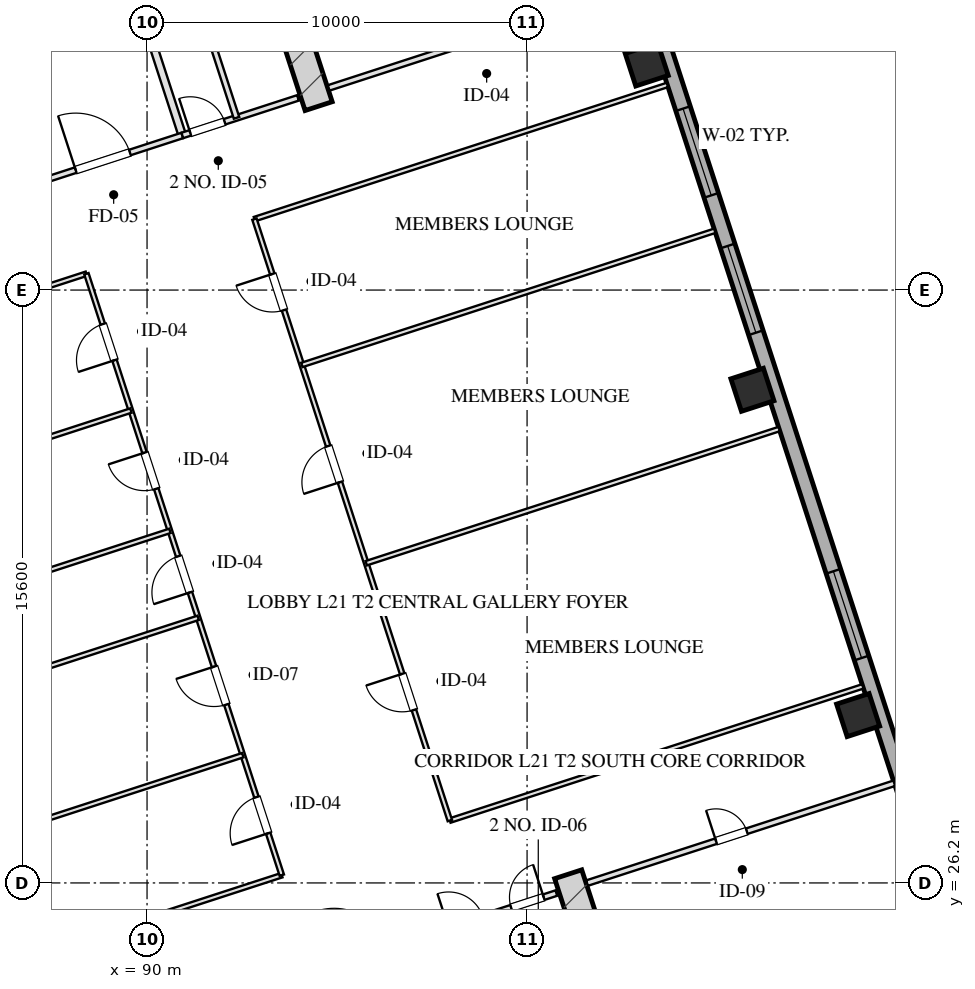
"""IFC4 building model, lengths in metres.
Left out: names, types, materials, properties, quantities, classifications, styles, units other than length and angle.
Written with IfcOpenShell. Run it as: python <this file> out.ifc"""

import sys

from ifc_helpers import new_model, si_unit, direction, frame, frame_2d, origin, origin_2d, place, context, subcontext, project, spatial, rectangle, hollow_rectangle, extrude, element, fill, save


model = new_model("IFC4")
c1 = context("Model", 3, precision=1e-05, world=origin(), true_north=direction((0.0, 1.0)))
c2 = subcontext(c1, "Body", "Model", "MODEL_VIEW")
j1 = project(units=[si_unit("LENGTHUNIT", "METRE"), si_unit("PLANEANGLEUNIT", "RADIAN")], contexts=[c1])
p1 = place(None, origin())
s1 = spatial("IfcSite", under=j1, at=p1, CompositionType="ELEMENT")
p2 = place(p1, origin())
s2 = spatial("IfcBuilding", under=s1, at=p2, CompositionType="ELEMENT")
p3 = place(p2, frame((0.0, 0.0, 85.1)))
s3 = spatial("IfcBuildingStorey", under=s2, at=p3, CompositionType="ELEMENT", Elevation=85.1)
for number, where, z_axis, x_axis in (
    (1, (101.082, 26.429, 0.0), (0.0, 0.0, 1.0), (0.309, -0.951, 0.0)),
    (2, (94.515, 46.639, 0.0), (0.0, 0.0, 1.0), (-0.309, 0.951, 0.0)),
):
    element("IfcWall", number, at=place(p3, frame(where, z_axis=z_axis, x_axis=x_axis)), inside=s3, PredefinedType="SHEAR", context=c2, shape_type="SweptSolid", body=[
        extrude(rectangle(XDim=9.63, YDim=0.75, at=frame_2d((4.815, 0.0))), origin(), (0.0, 0.0, 1.0), 3.45),
    ])
for number, where, z_axis, x_axis in (
    (3, (108.711, 30.616, 0.0), (0.0, 0.0, 1.0), (0.951, 0.309, 0.0)),
    (4, (105.93, 39.176, 0.0), (0.0, 0.0, 1.0), (0.951, 0.309, 0.0)),
    (5, (103.149, 47.736, 0.0), (0.0, 0.0, 1.0), (0.951, 0.309, 0.0)),
):
    element("IfcColumn", number, at=place(p3, frame(where, z_axis=z_axis, x_axis=x_axis)), inside=s3, PredefinedType="COLUMN", context=c2, shape_type="SweptSolid", body=[
        extrude(hollow_rectangle(XDim=0.9, YDim=0.9, WallThickness=0.032, at=origin_2d()), origin(), (0.0, 0.0, 1.0), 3.451),
    ])
p4 = place(p3, frame((99.284, 61.41, 0.0), z_axis=(0.0, 0.0, 1.0), x_axis=(0.309017542002, -0.95105633836, 0.0)))
e6 = element("IfcWall", 6, at=p4, inside=s3, PredefinedType="SOLIDWALL", context=c2, shape_type="SweptSolid", body=[
    extrude(rectangle(XDim=46.4, YDim=0.4, at=frame_2d((23.2, 0.0))), origin(), (0.0, 0.0, 1.0), 2.61),
])
p5 = place(p4, frame((28.4, 0.0, 0.75)))
e7 = element("IfcOpeningElement", 7, at=p5, cuts=e6, PredefinedType="OPENING", context=c2, shape_type="SweptSolid", body=[
    extrude(rectangle(XDim=2.4, YDim=1.46, at=frame_2d((1.2, 0.73))), frame((0.0, 0.21, 0.0), z_axis=(0.0, -1.0, 0.0), x_axis=(1.0, 0.0, 0.0)), (0.0, 0.0, 1.0), 0.42),
])
p6 = place(p4, frame((19.4, 0.0, 0.75)))
e8 = element("IfcOpeningElement", 8, at=p6, cuts=e6, PredefinedType="OPENING", context=c2, shape_type="SweptSolid", body=[
    extrude(rectangle(XDim=2.4, YDim=1.46, at=frame_2d((1.2, 0.73))), frame((0.0, 0.21, 0.0), z_axis=(0.0, -1.0, 0.0), x_axis=(1.0, 0.0, 0.0)), (0.0, 0.0, 1.0), 0.42),
])
p7 = place(p4, frame((15.6, 0.0, 0.75)))
e9 = element("IfcOpeningElement", 9, at=p7, cuts=e6, PredefinedType="OPENING", context=c2, shape_type="SweptSolid", body=[
    extrude(rectangle(XDim=2.4, YDim=1.46, at=frame_2d((1.2, 0.73))), frame((0.0, 0.21, 0.0), z_axis=(0.0, -1.0, 0.0), x_axis=(1.0, 0.0, 0.0)), (0.0, 0.0, 1.0), 0.42),
])
p8 = place(p3, frame((97.727, 24.944, 0.0), z_axis=(0.0, 0.0, 1.0), x_axis=(0.951036872128, 0.309077446369, 0.0)))
e10 = element("IfcWall", 10, at=p8, inside=s3, PredefinedType="PARTITIONING", context=c2, shape_type="SweptSolid", body=[
    extrude(rectangle(XDim=3.2, YDim=0.15, at=frame_2d((1.6, 0.0))), origin(), (0.0, 0.0, 1.0), 3.175),
])
p9 = place(p8, frame((0.22, 0.0, 0.0)))
e11 = element("IfcOpeningElement", 11, at=p9, cuts=e10, PredefinedType="OPENING", context=c2, shape_type="SweptSolid", body=[
    extrude(rectangle(XDim=0.95, YDim=2.05, at=frame_2d((0.475, 1.025))), frame((0.0, 0.085, 0.0), z_axis=(0.0, -1.0, 0.0), x_axis=(1.0, 0.0, 0.0)), (0.0, 0.0, 1.0), 0.17),
])
p10 = place(p8, frame((1.95, 0.0, 0.0)))
e12 = element("IfcOpeningElement", 12, at=p10, cuts=e10, PredefinedType="OPENING", context=c2, shape_type="SweptSolid", body=[
    extrude(rectangle(XDim=0.9, YDim=2.05, at=frame_2d((0.45, 1.025))), frame((0.0, 0.085, 0.0), z_axis=(0.0, -1.0, 0.0), x_axis=(1.0, 0.0, 0.0)), (0.0, 0.0, 1.0), 0.17),
])
p11 = place(p3, frame((90.928, 45.868, 0.0), z_axis=(0.0, 0.0, 1.0), x_axis=(-0.309042196757, 0.951048327176, 0.0)))
e13 = element("IfcWall", 13, at=p11, inside=s3, PredefinedType="PARTITIONING", context=c2, shape_type="SweptSolid", body=[
    extrude(rectangle(XDim=8.43, YDim=0.2, at=frame_2d((4.215, 0.0))), origin(), (0.0, 0.0, 1.0), 3.175),
])
p12 = place(p3, frame((86.743, 44.508, 0.0), z_axis=(0.0, 0.0, 1.0), x_axis=(0.951063829732, 0.308994485023, 0.0)))
e14 = element("IfcWall", 14, at=p12, inside=s3, PredefinedType="PARTITIONING", context=c2, shape_type="SweptSolid", body=[
    extrude(rectangle(XDim=4.4, YDim=0.15, at=frame_2d((2.2, 0.0))), origin(), (0.0, 0.0, 1.0), 3.175),
])
p13 = place(p12, frame((1.45, 0.0, 0.0)))
e15 = element("IfcOpeningElement", 15, at=p13, cuts=e14, PredefinedType="OPENING", context=c2, shape_type="SweptSolid", body=[
    extrude(rectangle(XDim=1.5, YDim=2.05, at=frame_2d((0.75, 1.025))), frame((0.0, 0.085, 0.0), z_axis=(0.0, -1.0, 0.0), x_axis=(1.0, 0.0, 0.0)), (0.0, 0.0, 1.0), 0.17),
])
p14 = place(p3, frame((85.718, 47.666, 0.0), z_axis=(0.0, 0.0, 1.0), x_axis=(0.951058531764, 0.30901079133, 0.0)))
e16 = element("IfcWall", 16, at=p14, inside=s3, PredefinedType="PARTITIONING", context=c2, shape_type="SweptSolid", body=[
    extrude(rectangle(XDim=4.4, YDim=0.2, at=frame_2d((2.2, 0.0))), origin(), (0.0, 0.0, 1.0), 3.175),
])
p15 = place(p14, frame((0.45, 0.0, 0.0)))
e17 = element("IfcOpeningElement", 17, at=p15, cuts=e16, PredefinedType="OPENING", context=c2, shape_type="SweptSolid", body=[
    extrude(rectangle(XDim=1.1, YDim=2.05, at=frame_2d((0.55, 1.025))), frame((0.0, 0.11, 0.0), z_axis=(0.0, -1.0, 0.0), x_axis=(1.0, 0.0, 0.0)), (0.0, 0.0, 1.0), 0.22),
])
p16 = place(p14, frame((2.55, 0.0, 0.0)))
e18 = element("IfcOpeningElement", 18, at=p16, cuts=e16, PredefinedType="OPENING", context=c2, shape_type="SweptSolid", body=[
    extrude(rectangle(XDim=1.1, YDim=2.05, at=frame_2d((0.55, 1.025))), frame((0.0, 0.11, 0.0), z_axis=(0.0, -1.0, 0.0), x_axis=(1.0, 0.0, 0.0)), (0.0, 0.0, 1.0), 0.22),
])
p17 = place(p3, frame((90.928, 45.868, 0.0), z_axis=(0.0, 0.0, 1.0), x_axis=(0.951059297078, 0.309008435874, 0.0)))
e19 = element("IfcWall", 19, at=p17, inside=s3, PredefinedType="PARTITIONING", context=c2, shape_type="SweptSolid", body=[
    extrude(rectangle(XDim=3.2, YDim=0.15, at=frame_2d((1.6, 0.0))), origin(), (0.0, 0.0, 1.0), 3.175),
])
p18 = place(p17, frame((0.22, 0.0, 0.0)))
e20 = element("IfcOpeningElement", 20, at=p18, cuts=e19, PredefinedType="OPENING", context=c2, shape_type="SweptSolid", body=[
    extrude(rectangle(XDim=0.95, YDim=2.05, at=frame_2d((0.475, 1.025))), frame((0.0, 0.085, 0.0), z_axis=(0.0, -1.0, 0.0), x_axis=(1.0, 0.0, 0.0)), (0.0, 0.0, 1.0), 0.17),
])
p19 = place(p3, frame((92.355, 46.331, 0.0), z_axis=(0.0, 0.0, 1.0), x_axis=(-0.309007490203, 0.951059604335, 0.0)))
e21 = element("IfcWall", 21, at=p19, inside=s3, PredefinedType="PARTITIONING", context=c2, shape_type="SweptSolid", body=[
    extrude(rectangle(XDim=8.43, YDim=0.15, at=frame_2d((4.215, 0.0))), origin(), (0.0, 0.0, 1.0), 3.175),
])
p20 = place(p19, frame((2.55, 0.0, 0.0)))
e22 = element("IfcOpeningElement", 22, at=p20, cuts=e21, PredefinedType="OPENING", context=c2, shape_type="SweptSolid", body=[
    extrude(rectangle(XDim=0.95, YDim=2.05, at=frame_2d((0.475, 1.025))), frame((0.0, 0.085, 0.0), z_axis=(0.0, -1.0, 0.0), x_axis=(1.0, 0.0, 0.0)), (0.0, 0.0, 1.0), 0.17),
])
p21 = place(p19, frame((5.8, 0.0, 0.0)))
e23 = element("IfcOpeningElement", 23, at=p21, cuts=e21, PredefinedType="OPENING", context=c2, shape_type="SweptSolid", body=[
    extrude(rectangle(XDim=0.9, YDim=2.05, at=frame_2d((0.45, 1.025))), frame((0.0, 0.085, 0.0), z_axis=(0.0, -1.0, 0.0), x_axis=(1.0, 0.0, 0.0)), (0.0, 0.0, 1.0), 0.17),
])
p22 = place(p3, frame((101.578, 26.196, 0.0), z_axis=(0.0, 0.0, 1.0), x_axis=(0.951062770994, 0.308997743729, 0.0)))
e24 = element("IfcWall", 24, at=p22, inside=s3, PredefinedType="PARTITIONING", context=c2, shape_type="SweptSolid", body=[
    extrude(rectangle(XDim=8.5, YDim=0.15, at=frame_2d((4.25, 0.0))), origin(), (0.0, 0.0, 1.0), 3.175),
])
p23 = place(p22, frame((3.57, 0.0, 0.0)))
e25 = element("IfcOpeningElement", 25, at=p23, cuts=e24, PredefinedType="OPENING", context=c2, shape_type="SweptSolid", body=[
    extrude(rectangle(XDim=0.85, YDim=2.05, at=frame_2d((0.425, 1.025))), frame((0.0, 0.085, 0.0), z_axis=(0.0, -1.0, 0.0), x_axis=(1.0, 0.0, 0.0)), (0.0, 0.0, 1.0), 0.17),
])
p24 = place(p3, frame((94.78, 47.119, 0.0), z_axis=(0.0, 0.0, 1.0), x_axis=(0.951054329824, 0.309023723562, 0.0)))
e26 = element("IfcWall", 26, at=p24, inside=s3, PredefinedType="PARTITIONING", context=c2, shape_type="SweptSolid", body=[
    extrude(rectangle(XDim=8.5, YDim=0.15, at=frame_2d((4.25, 0.0))), origin(), (0.0, 0.0, 1.0), 3.175),
])
p25 = place(p24, frame((3.57, 0.0, 0.0)))
e27 = element("IfcOpeningElement", 27, at=p25, cuts=e26, PredefinedType="OPENING", context=c2, shape_type="SweptSolid", body=[
    extrude(rectangle(XDim=1.0, YDim=2.05, at=frame_2d((0.5, 1.025))), frame((0.0, 0.085, 0.0), z_axis=(0.0, -1.0, 0.0), x_axis=(1.0, 0.0, 0.0)), (0.0, 0.0, 1.0), 0.17),
])
p26 = place(p3, frame((76.308, 20.803, 0.0), z_axis=(0.0, 0.0, 1.0), x_axis=(0.951054952586, 0.309021806935, 0.0)))
e28 = element("IfcWall", 28, at=p26, inside=s3, PredefinedType="PARTITIONING", context=c2, shape_type="SweptSolid", body=[
    extrude(rectangle(XDim=18.125, YDim=0.12, at=frame_2d((9.062, 0.0))), origin(), (0.0, 0.0, 1.0), 3.175),
])
p27 = place(p3, frame((97.968, 27.841, 0.0), z_axis=(0.0, 0.0, 1.0), x_axis=(0.951055737546, 0.309019391108, 0.0)))
e29 = element("IfcWall", 29, at=p27, inside=s3, PredefinedType="PARTITIONING", context=c2, shape_type="SweptSolid", body=[
    extrude(rectangle(XDim=11.425, YDim=0.12, at=frame_2d((5.712, 0.0))), origin(), (0.0, 0.0, 1.0), 3.175),
])
p28 = place(p3, frame((71.166, 36.629, 0.0), z_axis=(0.0, 0.0, 1.0), x_axis=(0.951057625014, 0.309013582067, 0.0)))
e30 = element("IfcWall", 30, at=p28, inside=s3, PredefinedType="PARTITIONING", context=c2, shape_type="SweptSolid", body=[
    extrude(rectangle(XDim=18.125, YDim=0.12, at=frame_2d((9.062, 0.0))), origin(), (0.0, 0.0, 1.0), 3.175),
])
p29 = place(p3, frame((92.826, 43.667, 0.0), z_axis=(0.0, 0.0, 1.0), x_axis=(0.951057778088, 0.309013110947, 0.0)))
e31 = element("IfcWall", 31, at=p29, inside=s3, PredefinedType="PARTITIONING", context=c2, shape_type="SweptSolid", body=[
    extrude(rectangle(XDim=11.425, YDim=0.12, at=frame_2d((5.712, 0.0))), origin(), (0.0, 0.0, 1.0), 3.175),
])
p30 = place(p3, frame((93.546, 26.404, 0.0), z_axis=(0.0, 0.0, 1.0), x_axis=(-0.309022042254, 0.951054876125, 0.0)))
e32 = element("IfcWall", 32, at=p30, inside=s3, PredefinedType="PARTITIONING", context=c2, shape_type="SweptSolid", body=[
    extrude(rectangle(XDim=16.64, YDim=0.12, at=frame_2d((8.32, 0.0))), origin(), (0.0, 0.0, 1.0), 3.175),
])
p31 = place(p30, frame((1.16, 0.0, 0.0)))
e33 = element("IfcOpeningElement", 33, at=p31, cuts=e32, PredefinedType="OPENING", context=c2, shape_type="SweptSolid", body=[
    extrude(rectangle(XDim=1.0, YDim=2.05, at=frame_2d((0.5, 1.025))), frame((0.0, 0.07, 0.0), z_axis=(0.0, -1.0, 0.0), x_axis=(1.0, 0.0, 0.0)), (0.0, 0.0, 1.0), 0.14),
])
p32 = place(p30, frame((4.72, 0.0, 0.0)))
e34 = element("IfcOpeningElement", 34, at=p32, cuts=e32, PredefinedType="OPENING", context=c2, shape_type="SweptSolid", body=[
    extrude(rectangle(XDim=1.05, YDim=2.05, at=frame_2d((0.525, 1.025))), frame((0.0, 0.07, 0.0), z_axis=(0.0, -1.0, 0.0), x_axis=(1.0, 0.0, 0.0)), (0.0, 0.0, 1.0), 0.14),
])
p33 = place(p30, frame((7.823, 0.0, 0.0)))
e35 = element("IfcOpeningElement", 35, at=p33, cuts=e32, PredefinedType="OPENING", context=c2, shape_type="SweptSolid", body=[
    extrude(rectangle(XDim=1.0, YDim=2.05, at=frame_2d((0.5, 1.025))), frame((0.0, 0.07, 0.0), z_axis=(0.0, -1.0, 0.0), x_axis=(1.0, 0.0, 0.0)), (0.0, 0.0, 1.0), 0.14),
])
p34 = place(p30, frame((10.69, 0.0, 0.0)))
e36 = element("IfcOpeningElement", 36, at=p34, cuts=e32, PredefinedType="OPENING", context=c2, shape_type="SweptSolid", body=[
    extrude(rectangle(XDim=1.0, YDim=2.05, at=frame_2d((0.5, 1.025))), frame((0.0, 0.07, 0.0), z_axis=(0.0, -1.0, 0.0), x_axis=(1.0, 0.0, 0.0)), (0.0, 0.0, 1.0), 0.14),
])
p35 = place(p30, frame((14.247, 0.0, 0.0)))
e37 = element("IfcOpeningElement", 37, at=p35, cuts=e32, PredefinedType="OPENING", context=c2, shape_type="SweptSolid", body=[
    extrude(rectangle(XDim=1.0, YDim=2.05, at=frame_2d((0.5, 1.025))), frame((0.0, 0.07, 0.0), z_axis=(0.0, -1.0, 0.0), x_axis=(1.0, 0.0, 0.0)), (0.0, 0.0, 1.0), 0.14),
])
p36 = place(p3, frame((97.968, 27.841, 0.0), z_axis=(0.0, 0.0, 1.0), x_axis=(-0.30901773025, 0.951056277195, 0.0)))
e38 = element("IfcWall", 38, at=p36, inside=s3, PredefinedType="PARTITIONING", context=c2, shape_type="SweptSolid", body=[
    extrude(rectangle(XDim=16.64, YDim=0.12, at=frame_2d((8.32, 0.0))), origin(), (0.0, 0.0, 1.0), 3.175),
])
p37 = place(p36, frame((3.06, 0.0, 0.0)))
e39 = element("IfcOpeningElement", 39, at=p37, cuts=e38, PredefinedType="OPENING", context=c2, shape_type="SweptSolid", body=[
    extrude(rectangle(XDim=1.0, YDim=2.05, at=frame_2d((0.5, 1.025))), frame((0.0, 0.07, 0.0), z_axis=(0.0, -1.0, 0.0), x_axis=(1.0, 0.0, 0.0)), (0.0, 0.0, 1.0), 0.14),
])
p38 = place(p36, frame((9.363, 0.0, 0.0)))
e40 = element("IfcOpeningElement", 40, at=p38, cuts=e38, PredefinedType="OPENING", context=c2, shape_type="SweptSolid", body=[
    extrude(rectangle(XDim=1.0, YDim=2.05, at=frame_2d((0.5, 1.025))), frame((0.0, 0.07, 0.0), z_axis=(0.0, -1.0, 0.0), x_axis=(1.0, 0.0, 0.0)), (0.0, 0.0, 1.0), 0.14),
])
p39 = place(p36, frame((14.123, 0.0, 0.0)))
e41 = element("IfcOpeningElement", 41, at=p39, cuts=e38, PredefinedType="OPENING", context=c2, shape_type="SweptSolid", body=[
    extrude(rectangle(XDim=1.0, YDim=2.05, at=frame_2d((0.5, 1.025))), frame((0.0, 0.07, 0.0), z_axis=(0.0, -1.0, 0.0), x_axis=(1.0, 0.0, 0.0)), (0.0, 0.0, 1.0), 0.14),
])
for number, where, z_axis, x_axis in (
    (42, (75.282, 23.96, 0.0), (0.0, 0.0, 1.0), (0.951, 0.309, 0.0)),
    (43, (74.108, 27.574, 0.0), (0.0, 0.0, 1.0), (0.951, 0.309, 0.0)),
):
    element("IfcWall", number, at=place(p3, frame(where, z_axis=z_axis, x_axis=x_axis)), inside=s3, PredefinedType="PARTITIONING", context=c2, shape_type="SweptSolid", body=[
        extrude(rectangle(XDim=18.125, YDim=0.12, at=frame_2d((9.062, 0.0))), origin(), (0.0, 0.0, 1.0), 3.175),
    ])
p40 = place(p3, frame((73.364, 29.863, 0.0), z_axis=(0.0, 0.0, 1.0), x_axis=(0.951057625014, 0.309013582067, 0.0)))
e44 = element("IfcWall", 44, at=p40, inside=s3, PredefinedType="PARTITIONING", context=c2, shape_type="SweptSolid", body=[
    extrude(rectangle(XDim=18.125, YDim=0.12, at=frame_2d((9.062, 0.0))), origin(), (0.0, 0.0, 1.0), 3.175),
])
p41 = place(p3, frame((72.336, 33.028, 0.0), z_axis=(0.0, 0.0, 1.0), x_axis=(0.951058911225, 0.309009623443, 0.0)))
e45 = element("IfcWall", 45, at=p41, inside=s3, PredefinedType="PARTITIONING", context=c2, shape_type="SweptSolid", body=[
    extrude(rectangle(XDim=18.125, YDim=0.12, at=frame_2d((9.062, 0.0))), origin(), (0.0, 0.0, 1.0), 3.175),
])
p42 = place(p3, frame((95.768, 34.612, 0.0), z_axis=(0.0, 0.0, 1.0), x_axis=(0.951055737546, 0.309019391108, 0.0)))
e46 = element("IfcWall", 46, at=p42, inside=s3, PredefinedType="PARTITIONING", context=c2, shape_type="SweptSolid", body=[
    extrude(rectangle(XDim=11.425, YDim=0.12, at=frame_2d((5.712, 0.0))), origin(), (0.0, 0.0, 1.0), 3.175),
])
p43 = place(p3, frame((94.073, 39.829, 0.0), z_axis=(0.0, 0.0, 1.0), x_axis=(0.951057778088, 0.309013110947, 0.0)))
e47 = element("IfcWall", 47, at=p43, inside=s3, PredefinedType="PARTITIONING", context=c2, shape_type="SweptSolid", body=[
    extrude(rectangle(XDim=11.425, YDim=0.12, at=frame_2d((5.712, 0.0))), origin(), (0.0, 0.0, 1.0), 3.175),
])
p44 = place(p5, origin())
e48 = element("IfcWindow", 48, at=p44, inside=s3, PartitioningType="TRIPLE_PANEL_VERTICAL", PredefinedType="WINDOW", context=c2, shape_type="SweptSolid", body=[
    extrude(rectangle(XDim=2.4, YDim=1.46, at=frame_2d((1.2, 0.73))), frame((0.0, 0.03, 0.0), z_axis=(0.0, -1.0, 0.0), x_axis=(1.0, 0.0, 0.0)), (0.0, 0.0, 1.0), 0.06),
])
fill(e7, e48)
p45 = place(p6, origin())
e49 = element("IfcWindow", 49, at=p45, inside=s3, PartitioningType="TRIPLE_PANEL_VERTICAL", PredefinedType="WINDOW", context=c2, shape_type="SweptSolid", body=[
    extrude(rectangle(XDim=2.4, YDim=1.46, at=frame_2d((1.2, 0.73))), frame((0.0, 0.03, 0.0), z_axis=(0.0, -1.0, 0.0), x_axis=(1.0, 0.0, 0.0)), (0.0, 0.0, 1.0), 0.06),
])
fill(e8, e49)
p46 = place(p7, origin())
e50 = element("IfcWindow", 50, at=p46, inside=s3, PartitioningType="TRIPLE_PANEL_VERTICAL", PredefinedType="WINDOW", context=c2, shape_type="SweptSolid", body=[
    extrude(rectangle(XDim=2.4, YDim=1.46, at=frame_2d((1.2, 0.73))), frame((0.0, 0.03, 0.0), z_axis=(0.0, -1.0, 0.0), x_axis=(1.0, 0.0, 0.0)), (0.0, 0.0, 1.0), 0.06),
])
fill(e9, e50)
p47 = place(p10, origin())
e51 = element("IfcDoor", 51, at=p47, inside=s3, OperationType="SINGLE_SWING_RIGHT", PredefinedType="DOOR", context=c2, shape_type="SweptSolid", body=[
    extrude(rectangle(XDim=0.9, YDim=2.05, at=frame_2d((0.45, 1.025))), frame((0.0, 0.025, 0.0), z_axis=(0.0, -1.0, 0.0), x_axis=(1.0, 0.0, 0.0)), (0.0, 0.0, 1.0), 0.05),
])
fill(e12, e51)
p48 = place(p13, origin())
e52 = element("IfcDoor", 52, at=p48, inside=s3, OperationType="SINGLE_SWING_LEFT", PredefinedType="DOOR", context=c2, shape_type="SweptSolid", body=[
    extrude(rectangle(XDim=1.5, YDim=2.05, at=frame_2d((0.75, 1.025))), frame((0.0, 0.025, 0.0), z_axis=(0.0, -1.0, 0.0), x_axis=(1.0, 0.0, 0.0)), (0.0, 0.0, 1.0), 0.05),
])
fill(e15, e52)
p49 = place(p18, origin())
e53 = element("IfcDoor", 53, at=p49, inside=s3, OperationType="SINGLE_SWING_LEFT", PredefinedType="DOOR", context=c2, shape_type="SweptSolid", body=[
    extrude(rectangle(XDim=0.95, YDim=2.05, at=frame_2d((0.475, 1.025))), frame((0.0, 0.025, 0.0), z_axis=(0.0, -1.0, 0.0), x_axis=(1.0, 0.0, 0.0)), (0.0, 0.0, 1.0), 0.05),
])
fill(e20, e53)
p50 = place(p23, origin())
e54 = element("IfcDoor", 54, at=p50, inside=s3, OperationType="SINGLE_SWING_LEFT", PredefinedType="DOOR", context=c2, shape_type="SweptSolid", body=[
    extrude(rectangle(XDim=0.85, YDim=2.05, at=frame_2d((0.425, 1.025))), frame((0.0, 0.025, 0.0), z_axis=(0.0, -1.0, 0.0), x_axis=(1.0, 0.0, 0.0)), (0.0, 0.0, 1.0), 0.05),
])
fill(e25, e54)
p51 = place(p31, origin())
e55 = element("IfcDoor", 55, at=p51, inside=s3, OperationType="SINGLE_SWING_LEFT", PredefinedType="DOOR", context=c2, shape_type="SweptSolid", body=[
    extrude(rectangle(XDim=1.0, YDim=2.05, at=frame_2d((0.5, 1.025))), frame((0.0, 0.025, 0.0), z_axis=(0.0, -1.0, 0.0), x_axis=(1.0, 0.0, 0.0)), (0.0, 0.0, 1.0), 0.05),
])
fill(e33, e55)
p52 = place(p32, origin())
e56 = element("IfcDoor", 56, at=p52, inside=s3, OperationType="SINGLE_SWING_RIGHT", PredefinedType="DOOR", context=c2, shape_type="SweptSolid", body=[
    extrude(rectangle(XDim=1.05, YDim=2.05, at=frame_2d((0.525, 1.025))), frame((0.0, 0.025, 0.0), z_axis=(0.0, -1.0, 0.0), x_axis=(1.0, 0.0, 0.0)), (0.0, 0.0, 1.0), 0.05),
])
fill(e34, e56)
p53 = place(p33, origin())
e57 = element("IfcDoor", 57, at=p53, inside=s3, OperationType="SINGLE_SWING_LEFT", PredefinedType="DOOR", context=c2, shape_type="SweptSolid", body=[
    extrude(rectangle(XDim=1.0, YDim=2.05, at=frame_2d((0.5, 1.025))), frame((0.0, 0.025, 0.0), z_axis=(0.0, -1.0, 0.0), x_axis=(1.0, 0.0, 0.0)), (0.0, 0.0, 1.0), 0.05),
])
fill(e35, e57)
p54 = place(p34, origin())
e58 = element("IfcDoor", 58, at=p54, inside=s3, OperationType="SINGLE_SWING_RIGHT", PredefinedType="DOOR", context=c2, shape_type="SweptSolid", body=[
    extrude(rectangle(XDim=1.0, YDim=2.05, at=frame_2d((0.5, 1.025))), frame((0.0, 0.025, 0.0), z_axis=(0.0, -1.0, 0.0), x_axis=(1.0, 0.0, 0.0)), (0.0, 0.0, 1.0), 0.05),
])
fill(e36, e58)
p55 = place(p35, origin())
e59 = element("IfcDoor", 59, at=p55, inside=s3, OperationType="SINGLE_SWING_LEFT", PredefinedType="DOOR", context=c2, shape_type="SweptSolid", body=[
    extrude(rectangle(XDim=1.0, YDim=2.05, at=frame_2d((0.5, 1.025))), frame((0.0, 0.025, 0.0), z_axis=(0.0, -1.0, 0.0), x_axis=(1.0, 0.0, 0.0)), (0.0, 0.0, 1.0), 0.05),
])
fill(e37, e59)
p56 = place(p37, origin())
e60 = element("IfcDoor", 60, at=p56, inside=s3, OperationType="SINGLE_SWING_RIGHT", PredefinedType="DOOR", context=c2, shape_type="SweptSolid", body=[
    extrude(rectangle(XDim=1.0, YDim=2.05, at=frame_2d((0.5, 1.025))), frame((0.0, 0.025, 0.0), z_axis=(0.0, -1.0, 0.0), x_axis=(1.0, 0.0, 0.0)), (0.0, 0.0, 1.0), 0.05),
])
fill(e39, e60)
p57 = place(p38, origin())
e61 = element("IfcDoor", 61, at=p57, inside=s3, OperationType="SINGLE_SWING_LEFT", PredefinedType="DOOR", context=c2, shape_type="SweptSolid", body=[
    extrude(rectangle(XDim=1.0, YDim=2.05, at=frame_2d((0.5, 1.025))), frame((0.0, 0.025, 0.0), z_axis=(0.0, -1.0, 0.0), x_axis=(1.0, 0.0, 0.0)), (0.0, 0.0, 1.0), 0.05),
])
fill(e40, e61)
p58 = place(p39, origin())
e62 = element("IfcDoor", 62, at=p58, inside=s3, OperationType="SINGLE_SWING_RIGHT", PredefinedType="DOOR", context=c2, shape_type="SweptSolid", body=[
    extrude(rectangle(XDim=1.0, YDim=2.05, at=frame_2d((0.5, 1.025))), frame((0.0, 0.025, 0.0), z_axis=(0.0, -1.0, 0.0), x_axis=(1.0, 0.0, 0.0)), (0.0, 0.0, 1.0), 0.05),
])
fill(e41, e62)
save(model, sys.argv[1])
